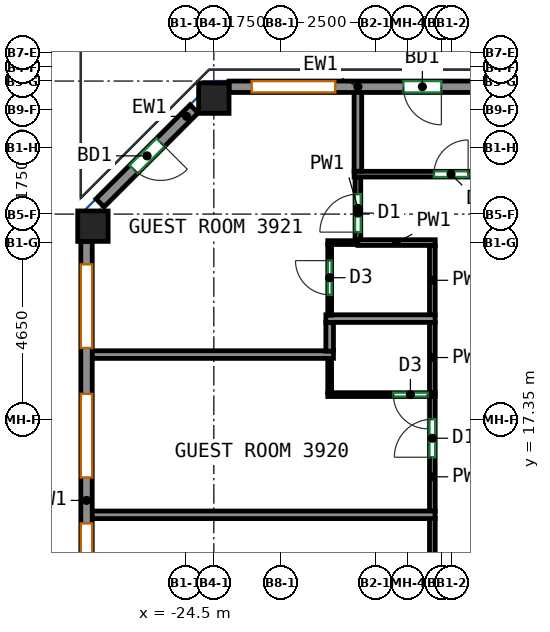
"""IFC4 building model, lengths in metres.
Left out: names, types, materials, properties, quantities, classifications, styles, units other than length and angle.
Written with IfcOpenShell. Run it as: python <this file> out.ifc"""

import sys

from ifc_helpers import new_model, si_unit, direction, frame, frame_2d, origin, origin_2d, place, context, subcontext, project, spatial, rectangle, extrude, source, transform, mapped, element, fill, save


model = new_model("IFC4")
c1 = context("Model", 3, precision=1e-05, world=origin(), true_north=direction((0.0, 1.0)))
c2 = subcontext(c1, "Body", "Model", "MODEL_VIEW")
j1 = project(units=[si_unit("LENGTHUNIT", "METRE"), si_unit("PLANEANGLEUNIT", "RADIAN")], contexts=[c1])
p1 = place(None, origin())
s1 = spatial("IfcSite", under=j1, at=p1, CompositionType="ELEMENT")
p2 = place(p1, origin())
s2 = spatial("IfcBuilding", under=s1, at=p2, CompositionType="ELEMENT")
p3 = place(p2, frame((0.0, 0.0, 168.5)))
s3 = spatial("IfcBuildingStorey", under=s2, at=p3, CompositionType="ELEMENT", Elevation=168.5)
m1 = source(origin(), c2, "Body", "SweptSolid", [
    extrude(rectangle(XDim=0.8, YDim=0.8, at=origin_2d()), origin(), (0.0, 0.0, 1.0), 3.12),
])
for number, where, z_axis, x_axis in (
    (1, (-26.932, 22.432, 0.0), (0.0, 0.0, 1.0), (1.0, 0.0, 0.0)),
    (2, (-23.75, 25.8, 0.0), (0.0, 0.0, 1.0), (1.0, 0.0, 0.0)),
):
    element("IfcColumn", number, at=place(p3, frame(where, z_axis=z_axis, x_axis=x_axis)), inside=s3, PredefinedType="COLUMN", context=c2, shape_type="MappedRepresentation", body=[
        mapped(m1, transform((0.0, 0.0, 0.0))),
    ])
m2 = source(origin(), c2, "Body", "SweptSolid", [
    extrude(rectangle(XDim=6.783, YDim=0.3, at=frame_2d((3.392, 0.0))), origin(), (0.0, 0.0, 1.0), 3.12),
])
p4 = place(p3, frame((-16.567, 26.1, 0.0), z_axis=(0.0, 0.0, 1.0), x_axis=(-1.0, 0.0, 0.0)))
e3 = element("IfcWall", 3, at=p4, inside=s3, PredefinedType="SOLIDWALL", context=c2, shape_type="MappedRepresentation", body=[
    mapped(m2, transform((0.0, 0.0, 0.0))),
])
p5 = place(p4, frame((1.196, 0.0, 0.0)))
e4 = element("IfcOpeningElement", 4, at=p5, cuts=e3, PredefinedType="OPENING", context=c2, shape_type="SweptSolid", body=[
    extrude(rectangle(XDim=1.0, YDim=2.1, at=frame_2d((0.5, 1.05))), frame((0.0, 0.16, 0.0), z_axis=(0.0, -1.0, 0.0), x_axis=(1.0, 0.0, 0.0)), (0.0, 0.0, 1.0), 0.32),
])
p6 = place(p4, frame((3.988, 0.0, 0.85)))
e5 = element("IfcOpeningElement", 5, at=p6, cuts=e3, PredefinedType="OPENING", context=c2, shape_type="SweptSolid", body=[
    extrude(rectangle(XDim=2.2, YDim=1.95, at=frame_2d((1.1, 0.975))), frame((0.0, 0.16, 0.0), z_axis=(0.0, -1.0, 0.0), x_axis=(1.0, 0.0, 0.0)), (0.0, 0.0, 1.0), 0.32),
])
m3 = source(origin(), c2, "Body", "SweptSolid", [
    extrude(rectangle(XDim=3.5, YDim=0.3, at=frame_2d((1.75, 0.0))), origin(), (0.0, 0.0, 1.0), 3.12),
])
p7 = place(p3, frame((-24.269, 25.519, 0.0), z_axis=(0.0, 0.0, 1.0), x_axis=(-0.707141656123, -0.70707190453, 0.0)))
e6 = element("IfcWall", 6, at=p7, inside=s3, PredefinedType="SOLIDWALL", context=c2, shape_type="MappedRepresentation", body=[
    mapped(m3, transform((0.0, 0.0, 0.0))),
])
p8 = place(p7, frame((1.25, 0.0, 0.0)))
e7 = element("IfcOpeningElement", 7, at=p8, cuts=e6, PredefinedType="OPENING", context=c2, shape_type="SweptSolid", body=[
    extrude(rectangle(XDim=1.0, YDim=2.1, at=frame_2d((0.5, 1.05))), frame((0.0, 0.16, 0.0), z_axis=(0.0, -1.0, 0.0), x_axis=(1.0, 0.0, 0.0)), (0.0, 0.0, 1.0), 0.32),
])
m4 = source(origin(), c2, "Body", "SweptSolid", [
    extrude(rectangle(XDim=13.632, YDim=0.3, at=frame_2d((6.816, 0.0))), origin(), (0.0, 0.0, 1.0), 3.12),
])
p9 = place(p3, frame((-27.1, 22.032, 0.0), z_axis=(0.0, 0.0, 1.0), x_axis=(0.0, -1.0, 0.0)))
e8 = element("IfcWall", 8, at=p9, inside=s3, PredefinedType="SOLIDWALL", context=c2, shape_type="MappedRepresentation", body=[
    mapped(m4, transform((0.0, 0.0, 0.0))),
])
p10 = place(p9, frame((0.604, 0.0, 0.85)))
e9 = element("IfcOpeningElement", 9, at=p10, cuts=e8, PredefinedType="OPENING", context=c2, shape_type="SweptSolid", body=[
    extrude(rectangle(XDim=2.2, YDim=1.95, at=frame_2d((1.1, 0.975))), frame((0.0, 0.16, 0.0), z_axis=(0.0, -1.0, 0.0), x_axis=(1.0, 0.0, 0.0)), (0.0, 0.0, 1.0), 0.32),
])
p11 = place(p9, frame((4.012, 0.0, 0.85)))
e10 = element("IfcOpeningElement", 10, at=p11, cuts=e8, PredefinedType="OPENING", context=c2, shape_type="SweptSolid", body=[
    extrude(rectangle(XDim=2.2, YDim=1.95, at=frame_2d((1.1, 0.975))), frame((0.0, 0.16, 0.0), z_axis=(0.0, -1.0, 0.0), x_axis=(1.0, 0.0, 0.0)), (0.0, 0.0, 1.0), 0.32),
])
p12 = place(p9, frame((7.42, 0.0, 0.85)))
e11 = element("IfcOpeningElement", 11, at=p12, cuts=e8, PredefinedType="OPENING", context=c2, shape_type="SweptSolid", body=[
    extrude(rectangle(XDim=2.2, YDim=1.95, at=frame_2d((1.1, 0.975))), frame((0.0, 0.16, 0.0), z_axis=(0.0, -1.0, 0.0), x_axis=(1.0, 0.0, 0.0)), (0.0, 0.0, 1.0), 0.32),
])
p13 = place(p9, frame((10.828, 0.0, 0.85)))
e12 = element("IfcOpeningElement", 12, at=p13, cuts=e8, PredefinedType="OPENING", context=c2, shape_type="SweptSolid", body=[
    extrude(rectangle(XDim=2.2, YDim=1.95, at=frame_2d((1.1, 0.975))), frame((0.0, 0.16, 0.0), z_axis=(0.0, -1.0, 0.0), x_axis=(1.0, 0.0, 0.0)), (0.0, 0.0, 1.0), 0.32),
])
p14 = place(p3, frame((-18.0, 10.04, 0.0), z_axis=(0.0, 0.0, 1.0), x_axis=(0.0, 1.0, 0.0)))
e13 = element("IfcWall", 13, at=p14, inside=s3, PredefinedType="PARTITIONING", context=c2, shape_type="SweptSolid", body=[
    extrude(rectangle(XDim=4.707, YDim=0.15, at=frame_2d((2.354, 0.0))), origin(), (0.0, 0.0, 1.0), 3.12),
])
p15 = place(p14, frame((0.501, 0.0, 0.0)))
e14 = element("IfcOpeningElement", 14, at=p15, cuts=e13, PredefinedType="OPENING", context=c2, shape_type="SweptSolid", body=[
    extrude(rectangle(XDim=1.0, YDim=2.1, at=frame_2d((0.5, 1.05))), frame((0.0, 0.085, 0.0), z_axis=(0.0, -1.0, 0.0), x_axis=(1.0, 0.0, 0.0)), (0.0, 0.0, 1.0), 0.17),
])
p16 = place(p3, frame((-18.0, 14.927, 0.0), z_axis=(0.0, 0.0, 1.0), x_axis=(0.0, 1.0, 0.0)))
e15 = element("IfcWall", 15, at=p16, inside=s3, PredefinedType="PARTITIONING", context=c2, shape_type="SweptSolid", body=[
    extrude(rectangle(XDim=3.033, YDim=0.15, at=frame_2d((1.517, 0.0))), origin(), (0.0, 0.0, 1.0), 3.12),
])
p17 = place(p16, frame((1.425, 0.0, 0.0)))
e16 = element("IfcOpeningElement", 16, at=p17, cuts=e15, PredefinedType="OPENING", context=c2, shape_type="SweptSolid", body=[
    extrude(rectangle(XDim=1.0, YDim=2.1, at=frame_2d((0.5, 1.05))), frame((0.0, 0.085, 0.0), z_axis=(0.0, -1.0, 0.0), x_axis=(1.0, 0.0, 0.0)), (0.0, 0.0, 1.0), 0.17),
])
p18 = place(p3, frame((-18.0, 18.04, 0.0), z_axis=(0.0, 0.0, 1.0), x_axis=(0.0, 1.0, 0.0)))
e17 = element("IfcWall", 17, at=p18, inside=s3, PredefinedType="PARTITIONING", context=c2, shape_type="SweptSolid", body=[
    extrude(rectangle(XDim=1.87, YDim=0.15, at=frame_2d((0.935, 0.0))), origin(), (0.0, 0.0, 1.0), 3.12),
])
p19 = place(p3, frame((-19.959, 22.075, 0.0), z_axis=(0.0, 0.0, 1.0), x_axis=(0.0, 1.0, 0.0)))
e18 = element("IfcWall", 18, at=p19, inside=s3, PredefinedType="PARTITIONING", context=c2, shape_type="SweptSolid", body=[
    extrude(rectangle(XDim=1.65, YDim=0.15, at=frame_2d((0.825, 0.0))), origin(), (0.0, 0.0, 1.0), 3.12),
])
p20 = place(p19, frame((0.2, 0.0, 0.0)))
e19 = element("IfcOpeningElement", 19, at=p20, cuts=e18, PredefinedType="OPENING", context=c2, shape_type="SweptSolid", body=[
    extrude(rectangle(XDim=1.0, YDim=2.1, at=frame_2d((0.5, 1.05))), frame((0.0, 0.085, 0.0), z_axis=(0.0, -1.0, 0.0), x_axis=(1.0, 0.0, 0.0)), (0.0, 0.0, 1.0), 0.17),
])
p21 = place(p3, frame((-18.0, 20.09, 0.0), z_axis=(0.0, 0.0, 1.0), x_axis=(0.0, 1.0, 0.0)))
e20 = element("IfcWall", 20, at=p21, inside=s3, PredefinedType="PARTITIONING", context=c2, shape_type="SweptSolid", body=[
    extrude(rectangle(XDim=1.835, YDim=0.15, at=frame_2d((0.917, 0.0))), origin(), (0.0, 0.0, 1.0), 3.12),
])
p22 = place(p3, frame((-19.959, 22.0, 0.0), z_axis=(0.0, 0.0, 1.0), x_axis=(1.0, 0.0, 0.0)))
e21 = element("IfcWall", 21, at=p22, inside=s3, PredefinedType="PARTITIONING", context=c2, shape_type="SweptSolid", body=[
    extrude(rectangle(XDim=2.034, YDim=0.15, at=frame_2d((1.017, 0.0))), origin(), (0.0, 0.0, 1.0), 3.12),
])
p23 = place(p3, frame((-20.059, 23.8, 0.0), z_axis=(0.0, 0.0, 1.0), x_axis=(1.0, 0.0, 0.0)))
e22 = element("IfcWall", 22, at=p23, inside=s3, PredefinedType="PARTITIONING", context=c2, shape_type="SweptSolid", body=[
    extrude(rectangle(XDim=41.909, YDim=0.15, at=frame_2d((20.955, 0.0))), origin(), (0.0, 0.0, 1.0), 3.12),
])
p24 = place(p23, frame((2.101, 0.0, 0.0)))
e23 = element("IfcOpeningElement", 23, at=p24, cuts=e22, PredefinedType="OPENING", context=c2, shape_type="SweptSolid", body=[
    extrude(rectangle(XDim=0.9, YDim=2.1, at=frame_2d((0.45, 1.05))), frame((0.0, 0.085, 0.0), z_axis=(0.0, -1.0, 0.0), x_axis=(1.0, 0.0, 0.0)), (0.0, 0.0, 1.0), 0.17),
])
p25 = place(p23, frame((4.585, 0.0, 0.0)))
e24 = element("IfcOpeningElement", 24, at=p25, cuts=e22, PredefinedType="OPENING", context=c2, shape_type="SweptSolid", body=[
    extrude(rectangle(XDim=1.0, YDim=2.1, at=frame_2d((0.5, 1.05))), frame((0.0, 0.085, 0.0), z_axis=(0.0, -1.0, 0.0), x_axis=(1.0, 0.0, 0.0)), (0.0, 0.0, 1.0), 0.17),
])
p26 = place(p23, frame((8.175, 0.0, 0.0)))
e25 = element("IfcOpeningElement", 25, at=p26, cuts=e22, PredefinedType="OPENING", context=c2, shape_type="SweptSolid", body=[
    extrude(rectangle(XDim=0.9, YDim=2.1, at=frame_2d((0.45, 1.05))), frame((0.0, 0.085, 0.0), z_axis=(0.0, -1.0, 0.0), x_axis=(1.0, 0.0, 0.0)), (0.0, 0.0, 1.0), 0.17),
])
p27 = place(p23, frame((13.173, 0.0, 0.0)))
e26 = element("IfcOpeningElement", 26, at=p27, cuts=e22, PredefinedType="OPENING", context=c2, shape_type="SweptSolid", body=[
    extrude(rectangle(XDim=1.0, YDim=2.1, at=frame_2d((0.5, 1.05))), frame((0.0, 0.085, 0.0), z_axis=(0.0, -1.0, 0.0), x_axis=(1.0, 0.0, 0.0)), (0.0, 0.0, 1.0), 0.17),
])
p28 = place(p23, frame((15.658, 0.0, 0.0)))
e27 = element("IfcOpeningElement", 27, at=p28, cuts=e22, PredefinedType="OPENING", context=c2, shape_type="SweptSolid", body=[
    extrude(rectangle(XDim=0.9, YDim=2.1, at=frame_2d((0.45, 1.05))), frame((0.0, 0.085, 0.0), z_axis=(0.0, -1.0, 0.0), x_axis=(1.0, 0.0, 0.0)), (0.0, 0.0, 1.0), 0.17),
])
p29 = place(p23, frame((21.315, 0.0, 0.0)))
e28 = element("IfcOpeningElement", 28, at=p29, cuts=e22, PredefinedType="OPENING", context=c2, shape_type="SweptSolid", body=[
    extrude(rectangle(XDim=0.9, YDim=2.1, at=frame_2d((0.45, 1.05))), frame((0.0, 0.085, 0.0), z_axis=(0.0, -1.0, 0.0), x_axis=(1.0, 0.0, 0.0)), (0.0, 0.0, 1.0), 0.17),
])
p30 = place(p23, frame((24.625, 0.0, 0.0)))
e29 = element("IfcOpeningElement", 29, at=p30, cuts=e22, PredefinedType="OPENING", context=c2, shape_type="SweptSolid", body=[
    extrude(rectangle(XDim=1.0, YDim=2.1, at=frame_2d((0.5, 1.05))), frame((0.0, 0.085, 0.0), z_axis=(0.0, -1.0, 0.0), x_axis=(1.0, 0.0, 0.0)), (0.0, 0.0, 1.0), 0.17),
])
p31 = place(p23, frame((29.043, 0.0, 0.0)))
e30 = element("IfcOpeningElement", 30, at=p31, cuts=e22, PredefinedType="OPENING", context=c2, shape_type="SweptSolid", body=[
    extrude(rectangle(XDim=0.9, YDim=2.1, at=frame_2d((0.45, 1.05))), frame((0.0, 0.085, 0.0), z_axis=(0.0, -1.0, 0.0), x_axis=(1.0, 0.0, 0.0)), (0.0, 0.0, 1.0), 0.17),
])
p32 = place(p23, frame((32.735, 0.0, 0.0)))
e31 = element("IfcOpeningElement", 31, at=p32, cuts=e22, PredefinedType="OPENING", context=c2, shape_type="SweptSolid", body=[
    extrude(rectangle(XDim=1.0, YDim=2.1, at=frame_2d((0.5, 1.05))), frame((0.0, 0.085, 0.0), z_axis=(0.0, -1.0, 0.0), x_axis=(1.0, 0.0, 0.0)), (0.0, 0.0, 1.0), 0.17),
])
p33 = place(p23, frame((36.627, 0.0, 0.0)))
e32 = element("IfcOpeningElement", 32, at=p33, cuts=e22, PredefinedType="OPENING", context=c2, shape_type="SweptSolid", body=[
    extrude(rectangle(XDim=0.9, YDim=2.1, at=frame_2d((0.45, 1.05))), frame((0.0, 0.085, 0.0), z_axis=(0.0, -1.0, 0.0), x_axis=(1.0, 0.0, 0.0)), (0.0, 0.0, 1.0), 0.17),
])
p34 = place(p23, frame((38.808, 0.0, 0.0)))
e33 = element("IfcOpeningElement", 33, at=p34, cuts=e22, PredefinedType="OPENING", context=c2, shape_type="SweptSolid", body=[
    extrude(rectangle(XDim=0.9, YDim=2.1, at=frame_2d((0.45, 1.05))), frame((0.0, 0.085, 0.0), z_axis=(0.0, -1.0, 0.0), x_axis=(1.0, 0.0, 0.0)), (0.0, 0.0, 1.0), 0.17),
])
p35 = place(p3, frame((-17.927, 14.837, 0.0), z_axis=(0.0, 0.0, 1.0), x_axis=(-1.0, 0.0, 0.0)))
e34 = element("IfcWall", 34, at=p35, inside=s3, PredefinedType="PARTITIONING", context=c2, shape_type="SweptSolid", body=[
    extrude(rectangle(XDim=9.073, YDim=0.2, at=frame_2d((4.537, 0.0))), origin(), (0.0, 0.0, 1.0), 3.12),
])
p36 = place(p3, frame((-17.927, 18.0, 0.0), z_axis=(0.0, 0.0, 1.0), x_axis=(-1.0, 0.0, 0.0)))
e35 = element("IfcWall", 35, at=p36, inside=s3, PredefinedType="PARTITIONING", context=c2, shape_type="SweptSolid", body=[
    extrude(rectangle(XDim=2.825, YDim=0.1, at=frame_2d((1.413, 0.0))), origin(), (0.0, 0.0, 1.0), 3.12),
])
p37 = place(p36, frame((0.2, 0.0, 0.0)))
e36 = element("IfcOpeningElement", 36, at=p37, cuts=e35, PredefinedType="OPENING", context=c2, shape_type="SweptSolid", body=[
    extrude(rectangle(XDim=0.9, YDim=2.1, at=frame_2d((0.45, 1.05))), frame((0.0, 0.06, 0.0), z_axis=(0.0, -1.0, 0.0), x_axis=(1.0, 0.0, 0.0)), (0.0, 0.0, 1.0), 0.12),
])
p38 = place(p3, frame((-20.702, 18.05, 0.0), z_axis=(0.0, 0.0, 1.0), x_axis=(0.0, 1.0, 0.0)))
e37 = element("IfcWall", 37, at=p38, inside=s3, PredefinedType="PARTITIONING", context=c2, shape_type="SweptSolid", body=[
    extrude(rectangle(XDim=0.903, YDim=0.1, at=frame_2d((0.451, 0.0))), origin(), (0.0, 0.0, 1.0), 3.12),
])
p39 = place(p3, frame((-20.602, 19.053, 0.0), z_axis=(0.0, 0.0, 1.0), x_axis=(-1.0, 0.0, 0.0)))
e38 = element("IfcWall", 38, at=p39, inside=s3, PredefinedType="PARTITIONING", context=c2, shape_type="SweptSolid", body=[
    extrude(rectangle(XDim=6.398, YDim=0.2, at=frame_2d((3.199, 0.0))), origin(), (0.0, 0.0, 1.0), 3.12),
])
p40 = place(p3, frame((-20.702, 19.9, 0.0), z_axis=(0.0, 0.0, 1.0), x_axis=(0.0, -1.0, 0.0)))
e39 = element("IfcWall", 39, at=p40, inside=s3, PredefinedType="PARTITIONING", context=c2, shape_type="SweptSolid", body=[
    extrude(rectangle(XDim=0.757, YDim=0.2, at=frame_2d((0.378, 0.0))), origin(), (0.0, 0.0, 1.0), 3.12),
])
p41 = place(p3, frame((-17.927, 20.0, 0.0), z_axis=(0.0, 0.0, 1.0), x_axis=(-1.0, 0.0, 0.0)))
e40 = element("IfcWall", 40, at=p41, inside=s3, PredefinedType="PARTITIONING", context=c2, shape_type="SweptSolid", body=[
    extrude(rectangle(XDim=2.875, YDim=0.2, at=frame_2d((1.438, 0.0))), origin(), (0.0, 0.0, 1.0), 3.12),
])
p42 = place(p3, frame((-20.752, 22.0, 0.0), z_axis=(0.0, 0.0, 1.0), x_axis=(1.0, 0.0, 0.0)))
e41 = element("IfcWall", 41, at=p42, inside=s3, PredefinedType="PARTITIONING", context=c2, shape_type="SweptSolid", body=[
    extrude(rectangle(XDim=0.791, YDim=0.1, at=frame_2d((0.396, 0.0))), origin(), (0.0, 0.0, 1.0), 3.12),
])
p43 = place(p3, frame((-20.702, 20.09, 0.0), z_axis=(0.0, 0.0, 1.0), x_axis=(0.0, 1.0, 0.0)))
e42 = element("IfcWall", 42, at=p43, inside=s3, PredefinedType="PARTITIONING", context=c2, shape_type="SweptSolid", body=[
    extrude(rectangle(XDim=1.86, YDim=0.1, at=frame_2d((0.93, 0.0))), origin(), (0.0, 0.0, 1.0), 3.12),
])
p44 = place(p43, frame((0.536, 0.0, 0.0)))
e43 = element("IfcOpeningElement", 43, at=p44, cuts=e42, PredefinedType="OPENING", context=c2, shape_type="SweptSolid", body=[
    extrude(rectangle(XDim=0.9, YDim=2.1, at=frame_2d((0.45, 1.05))), frame((0.0, 0.06, 0.0), z_axis=(0.0, -1.0, 0.0), x_axis=(1.0, 0.0, 0.0)), (0.0, 0.0, 1.0), 0.12),
])
p45 = place(p3, frame((-19.959, 23.877, 0.0), z_axis=(0.0, 0.0, 1.0), x_axis=(0.0, 1.0, 0.0)))
e44 = element("IfcWall", 44, at=p45, inside=s3, PredefinedType="PARTITIONING", context=c2, shape_type="SweptSolid", body=[
    extrude(rectangle(XDim=2.123, YDim=0.2, at=frame_2d((1.062, 0.0))), origin(), (0.0, 0.0, 1.0), 3.12),
])
p46 = place(p5, origin())
e45 = element("IfcDoor", 45, at=p46, inside=s3, OperationType="SINGLE_SWING_LEFT", PredefinedType="DOOR", context=c2, shape_type="SweptSolid", body=[
    extrude(rectangle(XDim=1.0, YDim=2.1, at=frame_2d((0.5, 1.05))), frame((0.0, 0.025, 0.0), z_axis=(0.0, -1.0, 0.0), x_axis=(1.0, 0.0, 0.0)), (0.0, 0.0, 1.0), 0.05),
])
fill(e4, e45)
p47 = place(p6, origin())
e46 = element("IfcWindow", 46, at=p47, inside=s3, PartitioningType="SINGLE_PANEL", PredefinedType="WINDOW", context=c2, shape_type="SweptSolid", body=[
    extrude(rectangle(XDim=2.2, YDim=1.95, at=frame_2d((1.1, 0.975))), frame((0.0, 0.03, 0.0), z_axis=(0.0, -1.0, 0.0), x_axis=(1.0, 0.0, 0.0)), (0.0, 0.0, 1.0), 0.06),
])
fill(e5, e46)
p48 = place(p8, origin())
e47 = element("IfcDoor", 47, at=p48, inside=s3, OperationType="SINGLE_SWING_LEFT", PredefinedType="DOOR", context=c2, shape_type="SweptSolid", body=[
    extrude(rectangle(XDim=1.0, YDim=2.1, at=frame_2d((0.5, 1.05))), frame((0.0, 0.025, 0.0), z_axis=(0.0, -1.0, 0.0), x_axis=(1.0, 0.0, 0.0)), (0.0, 0.0, 1.0), 0.05),
])
fill(e7, e47)
p49 = place(p10, origin())
e48 = element("IfcWindow", 48, at=p49, inside=s3, PartitioningType="SINGLE_PANEL", PredefinedType="WINDOW", context=c2, shape_type="SweptSolid", body=[
    extrude(rectangle(XDim=2.2, YDim=1.95, at=frame_2d((1.1, 0.975))), frame((0.0, 0.03, 0.0), z_axis=(0.0, -1.0, 0.0), x_axis=(1.0, 0.0, 0.0)), (0.0, 0.0, 1.0), 0.06),
])
fill(e9, e48)
p50 = place(p11, origin())
e49 = element("IfcWindow", 49, at=p50, inside=s3, PartitioningType="SINGLE_PANEL", PredefinedType="WINDOW", context=c2, shape_type="SweptSolid", body=[
    extrude(rectangle(XDim=2.2, YDim=1.95, at=frame_2d((1.1, 0.975))), frame((0.0, 0.03, 0.0), z_axis=(0.0, -1.0, 0.0), x_axis=(1.0, 0.0, 0.0)), (0.0, 0.0, 1.0), 0.06),
])
fill(e10, e49)
p51 = place(p12, origin())
e50 = element("IfcWindow", 50, at=p51, inside=s3, PartitioningType="SINGLE_PANEL", PredefinedType="WINDOW", context=c2, shape_type="SweptSolid", body=[
    extrude(rectangle(XDim=2.2, YDim=1.95, at=frame_2d((1.1, 0.975))), frame((0.0, 0.03, 0.0), z_axis=(0.0, -1.0, 0.0), x_axis=(1.0, 0.0, 0.0)), (0.0, 0.0, 1.0), 0.06),
])
fill(e11, e50)
p52 = place(p17, origin())
e51 = element("IfcDoor", 51, at=p52, inside=s3, OperationType="SINGLE_SWING_LEFT", PredefinedType="DOOR", context=c2, shape_type="SweptSolid", body=[
    extrude(rectangle(XDim=1.0, YDim=2.1, at=frame_2d((0.5, 1.05))), frame((0.0, 0.025, 0.0), z_axis=(0.0, -1.0, 0.0), x_axis=(1.0, 0.0, 0.0)), (0.0, 0.0, 1.0), 0.05),
])
fill(e16, e51)
p53 = place(p37, origin())
e52 = element("IfcDoor", 52, at=p53, inside=s3, OperationType="SINGLE_SWING_LEFT", PredefinedType="DOOR", context=c2, shape_type="SweptSolid", body=[
    extrude(rectangle(XDim=0.9, YDim=2.1, at=frame_2d((0.45, 1.05))), frame((0.0, 0.025, 0.0), z_axis=(0.0, -1.0, 0.0), x_axis=(1.0, 0.0, 0.0)), (0.0, 0.0, 1.0), 0.05),
])
fill(e36, e52)
p54 = place(p44, origin())
e53 = element("IfcDoor", 53, at=p54, inside=s3, OperationType="SINGLE_SWING_RIGHT", PredefinedType="DOOR", context=c2, shape_type="SweptSolid", body=[
    extrude(rectangle(XDim=0.9, YDim=2.1, at=frame_2d((0.45, 1.05))), frame((0.0, 0.025, 0.0), z_axis=(0.0, -1.0, 0.0), x_axis=(1.0, 0.0, 0.0)), (0.0, 0.0, 1.0), 0.05),
])
fill(e43, e53)
p55 = place(p20, origin())
e54 = element("IfcDoor", 54, at=p55, inside=s3, OperationType="SINGLE_SWING_LEFT", PredefinedType="DOOR", context=c2, shape_type="SweptSolid", body=[
    extrude(rectangle(XDim=1.0, YDim=2.1, at=frame_2d((0.5, 1.05))), frame((0.0, 0.025, 0.0), z_axis=(0.0, -1.0, 0.0), x_axis=(1.0, 0.0, 0.0)), (0.0, 0.0, 1.0), 0.05),
])
fill(e19, e54)
p56 = place(p24, origin())
e55 = element("IfcDoor", 55, at=p56, inside=s3, OperationType="SINGLE_SWING_RIGHT", PredefinedType="DOOR", context=c2, shape_type="SweptSolid", body=[
    extrude(rectangle(XDim=0.9, YDim=2.1, at=frame_2d((0.45, 1.05))), frame((0.0, 0.025, 0.0), z_axis=(0.0, -1.0, 0.0), x_axis=(1.0, 0.0, 0.0)), (0.0, 0.0, 1.0), 0.05),
])
fill(e23, e55)
save(model, sys.argv[1])
